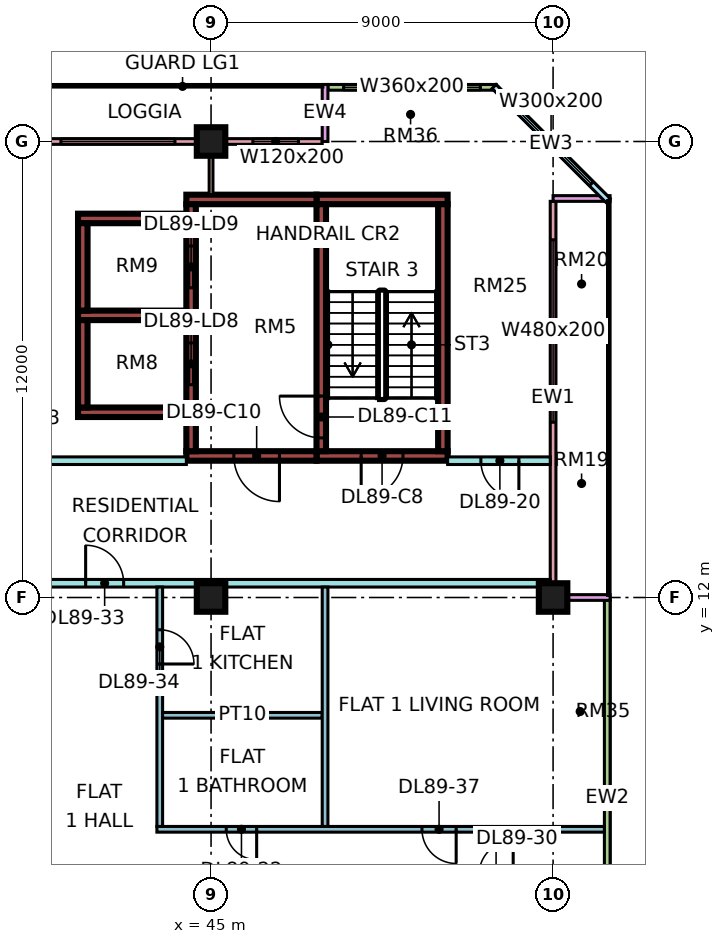
"""IFC4 building model, lengths in metres.
Left out: names, types, materials, properties, quantities, classifications, styles, units other than length and angle.
Written with IfcOpenShell. Run it as: python <this file> out.ifc"""

import sys

from ifc_helpers import new_model, si_unit, direction, frame, frame_2d, origin, origin_2d, place, context, subcontext, project, spatial, rectangle, extrude, element, fill, save


model = new_model("IFC4")
c1 = context("Model", 3, precision=1e-05, world=origin(), true_north=direction((0.0, 1.0)))
c2 = subcontext(c1, "Body", "Model", "MODEL_VIEW")
j1 = project(units=[si_unit("LENGTHUNIT", "METRE"), si_unit("PLANEANGLEUNIT", "RADIAN")], contexts=[c1])
p1 = place(None, origin())
s1 = spatial("IfcSite", under=j1, at=p1, CompositionType="ELEMENT")
p2 = place(p1, origin())
s2 = spatial("IfcBuilding", under=s1, at=p2, CompositionType="ELEMENT")
p3 = place(p2, frame((0.0, 0.0, 380.15)))
s3 = spatial("IfcBuildingStorey", under=s2, at=p3, CompositionType="ELEMENT", Elevation=380.15)
for number, where, z_axis, x_axis in (
    (1, (45.0, 12.0, 0.0), (0.0, 0.0, 1.0), (1.0, 0.0, 0.0)),
    (2, (45.0, 24.0, 0.0), (0.0, 0.0, 1.0), (1.0, 0.0, 0.0)),
    (3, (54.0, 12.0, 0.0), (0.0, 0.0, 1.0), (1.0, 0.0, 0.0)),
):
    element("IfcColumn", number, at=place(p3, frame(where, z_axis=z_axis, x_axis=x_axis)), inside=s3, PredefinedType="COLUMN", context=c2, shape_type="SweptSolid", body=[
        extrude(rectangle(XDim=0.75, YDim=0.75, at=origin_2d()), origin(), (0.0, 0.0, 1.0), 3.75),
    ])
p4 = place(p3, frame((47.775, 15.725, 0.0), z_axis=(0.0, 0.0, 1.0), x_axis=(1.0, 0.0, 0.0)))
e4 = element("IfcWall", 4, at=p4, inside=s3, PredefinedType="SHEAR", context=c2, shape_type="SweptSolid", body=[
    extrude(rectangle(XDim=3.45, YDim=0.25, at=frame_2d((1.725, 0.0))), origin(), (0.0, 0.0, 1.0), 3.75),
])
p5 = place(p4, frame((1.175, 0.0, 0.0)))
e5 = element("IfcOpeningElement", 5, at=p5, cuts=e4, PredefinedType="OPENING", context=c2, shape_type="SweptSolid", body=[
    extrude(rectangle(XDim=1.1, YDim=2.2, at=frame_2d((0.55, 1.1))), frame((0.0, 0.135, 0.0), z_axis=(0.0, -1.0, 0.0), x_axis=(1.0, 0.0, 0.0)), (0.0, 0.0, 1.0), 0.27),
])
p6 = place(p3, frame((47.775, 22.475, 0.0), z_axis=(0.0, 0.0, 1.0), x_axis=(1.0, 0.0, 0.0)))
e6 = element("IfcWall", 6, at=p6, inside=s3, PredefinedType="SHEAR", context=c2, shape_type="SweptSolid", body=[
    extrude(rectangle(XDim=3.45, YDim=0.25, at=frame_2d((1.725, 0.0))), origin(), (0.0, 0.0, 1.0), 3.75),
])
p7 = place(p3, frame((47.9, 15.85, 0.0), z_axis=(0.0, 0.0, 1.0), x_axis=(0.0, 1.0, 0.0)))
e7 = element("IfcWall", 7, at=p7, inside=s3, PredefinedType="SHEAR", context=c2, shape_type="SweptSolid", body=[
    extrude(rectangle(XDim=6.5, YDim=0.25, at=frame_2d((3.25, 0.0))), origin(), (0.0, 0.0, 1.0), 3.75),
])
p8 = place(p7, frame((0.35, 0.0, 0.0)))
e8 = element("IfcOpeningElement", 8, at=p8, cuts=e7, PredefinedType="OPENING", context=c2, shape_type="SweptSolid", body=[
    extrude(rectangle(XDim=1.1, YDim=2.2, at=frame_2d((0.55, 1.1))), frame((0.0, 0.135, 0.0), z_axis=(0.0, -1.0, 0.0), x_axis=(1.0, 0.0, 0.0)), (0.0, 0.0, 1.0), 0.27),
])
p9 = place(p3, frame((51.1, 15.85, 0.0), z_axis=(0.0, 0.0, 1.0), x_axis=(0.0, 1.0, 0.0)))
e9 = element("IfcWall", 9, at=p9, inside=s3, PredefinedType="SHEAR", context=c2, shape_type="SweptSolid", body=[
    extrude(rectangle(XDim=6.5, YDim=0.25, at=frame_2d((3.25, 0.0))), origin(), (0.0, 0.0, 1.0), 3.75),
])
p10 = place(p3, frame((44.35, 15.725, 0.0), z_axis=(0.0, 0.0, 1.0), x_axis=(1.0, 0.0, 0.0)))
e10 = element("IfcWall", 10, at=p10, inside=s3, PredefinedType="SHEAR", context=c2, shape_type="SweptSolid", body=[
    extrude(rectangle(XDim=3.425, YDim=0.25, at=frame_2d((1.712, 0.0))), origin(), (0.0, 0.0, 1.0), 3.75),
])
p11 = place(p10, frame((1.25, 0.0, 0.0)))
e11 = element("IfcOpeningElement", 11, at=p11, cuts=e10, PredefinedType="OPENING", context=c2, shape_type="SweptSolid", body=[
    extrude(rectangle(XDim=1.2, YDim=2.2, at=frame_2d((0.6, 1.1))), frame((0.0, 0.135, 0.0), z_axis=(0.0, -1.0, 0.0), x_axis=(1.0, 0.0, 0.0)), (0.0, 0.0, 1.0), 0.27),
])
p12 = place(p3, frame((44.35, 22.475, 0.0), z_axis=(0.0, 0.0, 1.0), x_axis=(1.0, 0.0, 0.0)))
e12 = element("IfcWall", 12, at=p12, inside=s3, PredefinedType="SHEAR", context=c2, shape_type="SweptSolid", body=[
    extrude(rectangle(XDim=3.425, YDim=0.25, at=frame_2d((1.712, 0.0))), origin(), (0.0, 0.0, 1.0), 3.75),
])
p13 = place(p3, frame((44.475, 15.85, 0.0), z_axis=(0.0, 0.0, 1.0), x_axis=(0.0, 1.0, 0.0)))
e13 = element("IfcWall", 13, at=p13, inside=s3, PredefinedType="SHEAR", context=c2, shape_type="SweptSolid", body=[
    extrude(rectangle(XDim=6.5, YDim=0.25, at=frame_2d((3.25, 0.0))), origin(), (0.0, 0.0, 1.0), 3.75),
])
p14 = place(p13, frame((1.75, 0.0, 0.0)))
e14 = element("IfcOpeningElement", 14, at=p14, cuts=e13, PredefinedType="OPENING", context=c2, shape_type="SweptSolid", body=[
    extrude(rectangle(XDim=1.1, YDim=2.2, at=frame_2d((0.55, 1.1))), frame((0.0, 0.135, 0.0), z_axis=(0.0, -1.0, 0.0), x_axis=(1.0, 0.0, 0.0)), (0.0, 0.0, 1.0), 0.27),
])
p15 = place(p13, frame((4.3, 0.0, 0.0)))
e15 = element("IfcOpeningElement", 15, at=p15, cuts=e13, PredefinedType="OPENING", context=c2, shape_type="SweptSolid", body=[
    extrude(rectangle(XDim=1.1, YDim=2.2, at=frame_2d((0.55, 1.1))), frame((0.0, 0.135, 0.0), z_axis=(0.0, -1.0, 0.0), x_axis=(1.0, 0.0, 0.0)), (0.0, 0.0, 1.0), 0.27),
])
for number, where, z_axis, x_axis in (
    (16, (41.5, 16.875, 0.0), (0.0, 0.0, 1.0), (1.0, 0.0, 0.0)),
    (17, (41.5, 19.425, 0.0), (0.0, 0.0, 1.0), (1.0, 0.0, 0.0)),
    (18, (41.5, 21.975, 0.0), (0.0, 0.0, 1.0), (1.0, 0.0, 0.0)),
):
    element("IfcWall", number, at=place(p3, frame(where, z_axis=z_axis, x_axis=x_axis)), inside=s3, PredefinedType="SHEAR", context=c2, shape_type="SweptSolid", body=[
        extrude(rectangle(XDim=2.85, YDim=0.25, at=frame_2d((1.425, 0.0))), origin(), (0.0, 0.0, 1.0), 3.75),
    ])
for number, where, z_axis, x_axis in (
    (19, (41.625, 17.0, 0.0), (0.0, 0.0, 1.0), (0.0, 1.0, 0.0)),
    (20, (41.625, 19.55, 0.0), (0.0, 0.0, 1.0), (0.0, 1.0, 0.0)),
):
    element("IfcWall", number, at=place(p3, frame(where, z_axis=z_axis, x_axis=x_axis)), inside=s3, PredefinedType="SHEAR", context=c2, shape_type="SweptSolid", body=[
        extrude(rectangle(XDim=2.3, YDim=0.25, at=frame_2d((1.15, 0.0))), origin(), (0.0, 0.0, 1.0), 3.75),
    ])
p16 = place(p3, frame((52.5, 25.425, 0.0), z_axis=(0.0, 0.0, 1.0), x_axis=(-1.0, 0.0, 0.0)))
e21 = element("IfcWall", 21, at=p16, inside=s3, PredefinedType="SOLIDWALL", context=c2, shape_type="SweptSolid", body=[
    extrude(rectangle(XDim=4.425, YDim=0.15, at=frame_2d((2.212, 0.0))), origin(), (0.0, 0.0, 1.0), 3.3),
])
p17 = place(p16, frame((0.413, 0.0, 0.45)))
e22 = element("IfcOpeningElement", 22, at=p17, cuts=e21, PredefinedType="OPENING", context=c2, shape_type="SweptSolid", body=[
    extrude(rectangle(XDim=3.6, YDim=2.0, at=frame_2d((1.8, 1.0))), frame((0.0, 0.085, 0.0), z_axis=(0.0, -1.0, 0.0), x_axis=(1.0, 0.0, 0.0)), (0.0, 0.0, 1.0), 0.17),
])
p18 = place(p3, frame((47.925, 24.0, 0.0), z_axis=(0.0, 0.0, 1.0), x_axis=(-1.0, 0.0, 0.0)))
e23 = element("IfcWall", 23, at=p18, inside=s3, PredefinedType="SOLIDWALL", context=c2, shape_type="SweptSolid", body=[
    extrude(rectangle(XDim=7.35, YDim=0.15, at=frame_2d((3.675, 0.0))), origin(), (0.0, 0.0, 1.0), 3.3),
])
p19 = place(p18, frame((0.625, 0.0, 0.45)))
e24 = element("IfcOpeningElement", 24, at=p19, cuts=e23, PredefinedType="OPENING", context=c2, shape_type="SweptSolid", body=[
    extrude(rectangle(XDim=1.2, YDim=2.0, at=frame_2d((0.6, 1.0))), frame((0.0, 0.085, 0.0), z_axis=(0.0, -1.0, 0.0), x_axis=(1.0, 0.0, 0.0)), (0.0, 0.0, 1.0), 0.17),
])
p20 = place(p18, frame((3.875, 0.0, 0.45)))
e25 = element("IfcOpeningElement", 25, at=p20, cuts=e23, PredefinedType="OPENING", context=c2, shape_type="SweptSolid", body=[
    extrude(rectangle(XDim=3.0, YDim=2.0, at=frame_2d((1.5, 1.0))), frame((0.0, 0.085, 0.0), z_axis=(0.0, -1.0, 0.0), x_axis=(1.0, 0.0, 0.0)), (0.0, 0.0, 1.0), 0.17),
])
p21 = place(p3, frame((48.0, 25.5, 0.0), z_axis=(0.0, 0.0, 1.0), x_axis=(0.0, -1.0, 0.0)))
e26 = element("IfcWall", 26, at=p21, inside=s3, PredefinedType="SOLIDWALL", context=c2, shape_type="SweptSolid", body=[
    extrude(rectangle(XDim=1.5, YDim=0.15, at=frame_2d((0.75, 0.0))), origin(), (0.0, 0.0, 1.0), 3.3),
])
p22 = place(p3, frame((55.425, 1.5, 0.0), z_axis=(0.0, 0.0, 1.0), x_axis=(0.0, 1.0, 0.0)))
e27 = element("IfcWall", 27, at=p22, inside=s3, PredefinedType="SOLIDWALL", context=c2, shape_type="SweptSolid", body=[
    extrude(rectangle(XDim=10.425, YDim=0.15, at=frame_2d((5.212, 0.0))), origin(), (0.0, 0.0, 1.0), 3.3),
])
p23 = place(p22, frame((0.4, 0.0, 0.45)))
e28 = element("IfcOpeningElement", 28, at=p23, cuts=e27, PredefinedType="OPENING", context=c2, shape_type="SweptSolid", body=[
    extrude(rectangle(XDim=2.4, YDim=2.0, at=frame_2d((1.2, 1.0))), frame((0.0, 0.085, 0.0), z_axis=(0.0, -1.0, 0.0), x_axis=(1.0, 0.0, 0.0)), (0.0, 0.0, 1.0), 0.17),
])
p24 = place(p3, frame((54.0, 12.075, 0.0), z_axis=(0.0, 0.0, 1.0), x_axis=(0.0, 1.0, 0.0)))
e29 = element("IfcWall", 29, at=p24, inside=s3, PredefinedType="SOLIDWALL", context=c2, shape_type="SweptSolid", body=[
    extrude(rectangle(XDim=10.35, YDim=0.15, at=frame_2d((5.175, 0.0))), origin(), (0.0, 0.0, 1.0), 3.3),
])
p25 = place(p24, frame((4.538, 0.0, 0.45)))
e30 = element("IfcOpeningElement", 30, at=p25, cuts=e29, PredefinedType="OPENING", context=c2, shape_type="SweptSolid", body=[
    extrude(rectangle(XDim=4.8, YDim=2.0, at=frame_2d((2.4, 1.0))), frame((0.0, 0.085, 0.0), z_axis=(0.0, -1.0, 0.0), x_axis=(1.0, 0.0, 0.0)), (0.0, 0.0, 1.0), 0.17),
])
for number, where, z_axis, x_axis in (
    (31, (55.5, 12.0, 0.0), (0.0, 0.0, 1.0), (-1.0, 0.0, 0.0)),
    (32, (55.5, 22.5, 0.0), (0.0, 0.0, 1.0), (-1.0, 0.0, 0.0)),
):
    element("IfcWall", number, at=place(p3, frame(where, z_axis=z_axis, x_axis=x_axis)), inside=s3, PredefinedType="SOLIDWALL", context=c2, shape_type="SweptSolid", body=[
        extrude(rectangle(XDim=1.5, YDim=0.15, at=frame_2d((0.75, 0.0))), origin(), (0.0, 0.0, 1.0), 3.3),
    ])
p26 = place(p3, frame((55.447, 22.447, 0.0), z_axis=(0.0, 0.0, 1.0), x_axis=(-0.707106781187, 0.707106781187, 0.0)))
e33 = element("IfcWall", 33, at=p26, inside=s3, PredefinedType="SOLIDWALL", context=c2, shape_type="SweptSolid", body=[
    extrude(rectangle(XDim=4.243, YDim=0.15, at=frame_2d((2.121, 0.0))), origin(), (0.0, 0.0, 1.0), 3.3),
])
p27 = place(p26, frame((0.621, 0.0, 0.45)))
e34 = element("IfcOpeningElement", 34, at=p27, cuts=e33, PredefinedType="OPENING", context=c2, shape_type="SweptSolid", body=[
    extrude(rectangle(XDim=3.0, YDim=2.0, at=frame_2d((1.5, 1.0))), frame((0.0, 0.085, 0.0), z_axis=(0.0, -1.0, 0.0), x_axis=(1.0, 0.0, 0.0)), (0.0, 0.0, 1.0), 0.17),
])
p28 = place(p3, frame((34.0, 15.6, 0.0), z_axis=(0.0, 0.0, 1.0), x_axis=(1.0, 0.0, 0.0)))
e35 = element("IfcWall", 35, at=p28, inside=s3, PredefinedType="PARTITIONING", context=c2, shape_type="SweptSolid", body=[
    extrude(rectangle(XDim=10.35, YDim=0.2, at=frame_2d((5.175, 0.0))), origin(), (0.0, 0.0, 1.0), 3.3),
])
p29 = place(p28, frame((5.6, 0.0, 0.0)))
e36 = element("IfcOpeningElement", 36, at=p29, cuts=e35, PredefinedType="OPENING", context=c2, shape_type="SweptSolid", body=[
    extrude(rectangle(XDim=1.0, YDim=2.1, at=frame_2d((0.5, 1.05))), frame((0.0, 0.11, 0.0), z_axis=(0.0, -1.0, 0.0), x_axis=(1.0, 0.0, 0.0)), (0.0, 0.0, 1.0), 0.22),
])
p30 = place(p28, frame((0.45, 0.0, 0.0)))
e37 = element("IfcOpeningElement", 37, at=p30, cuts=e35, PredefinedType="OPENING", context=c2, shape_type="SweptSolid", body=[
    extrude(rectangle(XDim=1.2, YDim=2.1, at=frame_2d((0.6, 1.05))), frame((0.0, 0.11, 0.0), z_axis=(0.0, -1.0, 0.0), x_axis=(1.0, 0.0, 0.0)), (0.0, 0.0, 1.0), 0.22),
])
p31 = place(p3, frame((40.65, 12.375, 0.0), z_axis=(0.0, 0.0, 1.0), x_axis=(1.0, 0.0, 0.0)))
e38 = element("IfcWall", 38, at=p31, inside=s3, PredefinedType="PARTITIONING", context=c2, shape_type="SweptSolid", body=[
    extrude(rectangle(XDim=13.276, YDim=0.2, at=frame_2d((6.638, 0.0))), origin(), (0.0, 0.0, 1.0), 3.3),
])
p32 = place(p31, frame((1.05, 0.0, 0.0)))
e39 = element("IfcOpeningElement", 39, at=p32, cuts=e38, PredefinedType="OPENING", context=c2, shape_type="SweptSolid", body=[
    extrude(rectangle(XDim=1.0, YDim=2.1, at=frame_2d((0.5, 1.05))), frame((0.0, 0.11, 0.0), z_axis=(0.0, -1.0, 0.0), x_axis=(1.0, 0.0, 0.0)), (0.0, 0.0, 1.0), 0.22),
])
p33 = place(p3, frame((43.575, 5.9, 0.0), z_axis=(0.0, 0.0, 1.0), x_axis=(1.0, 0.0, 0.0)))
e40 = element("IfcWall", 40, at=p33, inside=s3, PredefinedType="PARTITIONING", context=c2, shape_type="SweptSolid", body=[
    extrude(rectangle(XDim=11.775, YDim=0.15, at=frame_2d((5.888, 0.0))), origin(), (0.0, 0.0, 1.0), 3.3),
])
p34 = place(p33, frame((1.825, 0.0, 0.0)))
e41 = element("IfcOpeningElement", 41, at=p34, cuts=e40, PredefinedType="OPENING", context=c2, shape_type="SweptSolid", body=[
    extrude(rectangle(XDim=0.8, YDim=2.1, at=frame_2d((0.4, 1.05))), frame((0.0, 0.085, 0.0), z_axis=(0.0, -1.0, 0.0), x_axis=(1.0, 0.0, 0.0)), (0.0, 0.0, 1.0), 0.17),
])
p35 = place(p33, frame((6.975, 0.0, 0.0)))
e42 = element("IfcOpeningElement", 42, at=p35, cuts=e40, PredefinedType="OPENING", context=c2, shape_type="SweptSolid", body=[
    extrude(rectangle(XDim=0.9, YDim=2.1, at=frame_2d((0.45, 1.05))), frame((0.0, 0.085, 0.0), z_axis=(0.0, -1.0, 0.0), x_axis=(1.0, 0.0, 0.0)), (0.0, 0.0, 1.0), 0.17),
])
p36 = place(p3, frame((43.65, 5.975, 0.0), z_axis=(0.0, 0.0, 1.0), x_axis=(0.0, 1.0, 0.0)))
e43 = element("IfcWall", 43, at=p36, inside=s3, PredefinedType="PARTITIONING", context=c2, shape_type="SweptSolid", body=[
    extrude(rectangle(XDim=6.3, YDim=0.15, at=frame_2d((3.15, 0.0))), origin(), (0.0, 0.0, 1.0), 3.3),
])
p37 = place(p36, frame((4.275, 0.0, 0.0)))
e44 = element("IfcOpeningElement", 44, at=p37, cuts=e43, PredefinedType="OPENING", context=c2, shape_type="SweptSolid", body=[
    extrude(rectangle(XDim=0.9, YDim=2.1, at=frame_2d((0.45, 1.05))), frame((0.0, 0.085, 0.0), z_axis=(0.0, -1.0, 0.0), x_axis=(1.0, 0.0, 0.0)), (0.0, 0.0, 1.0), 0.17),
])
p38 = place(p3, frame((43.725, 8.9, 0.0), z_axis=(0.0, 0.0, 1.0), x_axis=(1.0, 0.0, 0.0)))
e45 = element("IfcWall", 45, at=p38, inside=s3, PredefinedType="PARTITIONING", context=c2, shape_type="SweptSolid", body=[
    extrude(rectangle(XDim=4.2, YDim=0.15, at=frame_2d((2.1, 0.0))), origin(), (0.0, 0.0, 1.0), 3.3),
])
p39 = place(p3, frame((45.0, 22.6, 0.0), z_axis=(0.0, 0.0, 1.0), x_axis=(0.0, 1.0, 0.0)))
e46 = element("IfcWall", 46, at=p39, inside=s3, PredefinedType="PARTITIONING", context=c2, shape_type="SweptSolid", body=[
    extrude(rectangle(XDim=1.326, YDim=0.1, at=frame_2d((0.663, 0.0))), origin(), (0.0, 0.0, 1.0), 3.3),
])
p40 = place(p3, frame((48.0, 5.975, 0.0), z_axis=(0.0, 0.0, 1.0), x_axis=(0.0, 1.0, 0.0)))
e47 = element("IfcWall", 47, at=p40, inside=s3, PredefinedType="PARTITIONING", context=c2, shape_type="SweptSolid", body=[
    extrude(rectangle(XDim=6.3, YDim=0.15, at=frame_2d((3.15, 0.0))), origin(), (0.0, 0.0, 1.0), 3.3),
])
p41 = place(p3, frame((51.225, 15.6, 0.0), z_axis=(0.0, 0.0, 1.0), x_axis=(1.0, 0.0, 0.0)))
e48 = element("IfcWall", 48, at=p41, inside=s3, PredefinedType="PARTITIONING", context=c2, shape_type="SweptSolid", body=[
    extrude(rectangle(XDim=2.701, YDim=0.2, at=frame_2d((1.351, 0.0))), origin(), (0.0, 0.0, 1.0), 3.3),
])
p42 = place(p41, frame((0.875, 0.0, 0.0)))
e49 = element("IfcOpeningElement", 49, at=p42, cuts=e48, PredefinedType="OPENING", context=c2, shape_type="SweptSolid", body=[
    extrude(rectangle(XDim=1.0, YDim=2.1, at=frame_2d((0.5, 1.05))), frame((0.0, 0.11, 0.0), z_axis=(0.0, -1.0, 0.0), x_axis=(1.0, 0.0, 0.0)), (0.0, 0.0, 1.0), 0.22),
])
p43 = place(p17, origin())
e50 = element("IfcWindow", 50, at=p43, inside=s3, PartitioningType="SINGLE_PANEL", PredefinedType="WINDOW", context=c2, shape_type="SweptSolid", body=[
    extrude(rectangle(XDim=3.6, YDim=2.0, at=frame_2d((1.8, 1.0))), frame((0.0, 0.03, 0.0), z_axis=(0.0, -1.0, 0.0), x_axis=(1.0, 0.0, 0.0)), (0.0, 0.0, 1.0), 0.06),
])
fill(e22, e50)
p44 = place(p19, origin())
e51 = element("IfcWindow", 51, at=p44, inside=s3, PartitioningType="SINGLE_PANEL", PredefinedType="WINDOW", context=c2, shape_type="SweptSolid", body=[
    extrude(rectangle(XDim=1.2, YDim=2.0, at=frame_2d((0.6, 1.0))), frame((0.0, 0.03, 0.0), z_axis=(0.0, -1.0, 0.0), x_axis=(1.0, 0.0, 0.0)), (0.0, 0.0, 1.0), 0.06),
])
fill(e24, e51)
p45 = place(p20, origin())
e52 = element("IfcWindow", 52, at=p45, inside=s3, PartitioningType="SINGLE_PANEL", PredefinedType="WINDOW", context=c2, shape_type="SweptSolid", body=[
    extrude(rectangle(XDim=3.0, YDim=2.0, at=frame_2d((1.5, 1.0))), frame((0.0, 0.03, 0.0), z_axis=(0.0, -1.0, 0.0), x_axis=(1.0, 0.0, 0.0)), (0.0, 0.0, 1.0), 0.06),
])
fill(e25, e52)
p46 = place(p25, origin())
e53 = element("IfcWindow", 53, at=p46, inside=s3, PartitioningType="SINGLE_PANEL", PredefinedType="WINDOW", context=c2, shape_type="SweptSolid", body=[
    extrude(rectangle(XDim=4.8, YDim=2.0, at=frame_2d((2.4, 1.0))), frame((0.0, 0.03, 0.0), z_axis=(0.0, -1.0, 0.0), x_axis=(1.0, 0.0, 0.0)), (0.0, 0.0, 1.0), 0.06),
])
fill(e30, e53)
p47 = place(p27, origin())
e54 = element("IfcWindow", 54, at=p47, inside=s3, PartitioningType="SINGLE_PANEL", PredefinedType="WINDOW", context=c2, shape_type="SweptSolid", body=[
    extrude(rectangle(XDim=3.0, YDim=2.0, at=frame_2d((1.5, 1.0))), frame((0.0, 0.03, 0.0), z_axis=(0.0, -1.0, 0.0), x_axis=(1.0, 0.0, 0.0)), (0.0, 0.0, 1.0), 0.06),
])
fill(e34, e54)
p48 = place(p5, frame((1.1, 0.0, 0.0), z_axis=(0.0, 0.0, 1.0), x_axis=(-1.0, 0.0, 0.0)))
e55 = element("IfcDoor", 55, at=p48, inside=s3, OperationType="SINGLE_SWING_LEFT", PredefinedType="DOOR", context=c2, shape_type="SweptSolid", body=[
    extrude(rectangle(XDim=1.1, YDim=2.2, at=frame_2d((0.55, 1.1))), frame((0.0, 0.025, 0.0), z_axis=(0.0, -1.0, 0.0), x_axis=(1.0, 0.0, 0.0)), (0.0, 0.0, 1.0), 0.05),
])
fill(e5, e55)
p49 = place(p11, origin())
e56 = element("IfcDoor", 56, at=p49, inside=s3, OperationType="SINGLE_SWING_RIGHT", PredefinedType="DOOR", context=c2, shape_type="SweptSolid", body=[
    extrude(rectangle(XDim=1.2, YDim=2.2, at=frame_2d((0.6, 1.1))), frame((0.0, 0.025, 0.0), z_axis=(0.0, -1.0, 0.0), x_axis=(1.0, 0.0, 0.0)), (0.0, 0.0, 1.0), 0.05),
])
fill(e11, e56)
p50 = place(p8, frame((1.1, 0.0, 0.0), z_axis=(0.0, 0.0, 1.0), x_axis=(-1.0, 0.0, 0.0)))
e57 = element("IfcDoor", 57, at=p50, inside=s3, OperationType="SINGLE_SWING_RIGHT", PredefinedType="DOOR", context=c2, shape_type="SweptSolid", body=[
    extrude(rectangle(XDim=1.1, YDim=2.2, at=frame_2d((0.55, 1.1))), frame((0.0, 0.025, 0.0), z_axis=(0.0, -1.0, 0.0), x_axis=(1.0, 0.0, 0.0)), (0.0, 0.0, 1.0), 0.05),
])
fill(e8, e57)
p51 = place(p14, origin())
e58 = element("IfcDoor", 58, at=p51, inside=s3, OperationType="DOUBLE_DOOR_SLIDING", PredefinedType="DOOR", context=c2, shape_type="SweptSolid", body=[
    extrude(rectangle(XDim=1.1, YDim=2.2, at=frame_2d((0.55, 1.1))), frame((0.0, 0.025, 0.0), z_axis=(0.0, -1.0, 0.0), x_axis=(1.0, 0.0, 0.0)), (0.0, 0.0, 1.0), 0.05),
])
fill(e14, e58)
p52 = place(p15, origin())
e59 = element("IfcDoor", 59, at=p52, inside=s3, OperationType="DOUBLE_DOOR_SLIDING", PredefinedType="DOOR", context=c2, shape_type="SweptSolid", body=[
    extrude(rectangle(XDim=1.1, YDim=2.2, at=frame_2d((0.55, 1.1))), frame((0.0, 0.025, 0.0), z_axis=(0.0, -1.0, 0.0), x_axis=(1.0, 0.0, 0.0)), (0.0, 0.0, 1.0), 0.05),
])
fill(e15, e59)
p53 = place(p42, origin())
e60 = element("IfcDoor", 60, at=p53, inside=s3, OperationType="SINGLE_SWING_RIGHT", PredefinedType="DOOR", context=c2, shape_type="SweptSolid", body=[
    extrude(rectangle(XDim=1.0, YDim=2.1, at=frame_2d((0.5, 1.05))), frame((0.0, 0.025, 0.0), z_axis=(0.0, -1.0, 0.0), x_axis=(1.0, 0.0, 0.0)), (0.0, 0.0, 1.0), 0.05),
])
fill(e49, e60)
p54 = place(p34, origin())
e61 = element("IfcDoor", 61, at=p54, inside=s3, OperationType="SINGLE_SWING_RIGHT", PredefinedType="DOOR", context=c2, shape_type="SweptSolid", body=[
    extrude(rectangle(XDim=0.8, YDim=2.1, at=frame_2d((0.4, 1.05))), frame((0.0, 0.025, 0.0), z_axis=(0.0, -1.0, 0.0), x_axis=(1.0, 0.0, 0.0)), (0.0, 0.0, 1.0), 0.05),
])
fill(e41, e61)
p55 = place(p32, origin())
e62 = element("IfcDoor", 62, at=p55, inside=s3, OperationType="SINGLE_SWING_LEFT", PredefinedType="DOOR", context=c2, shape_type="SweptSolid", body=[
    extrude(rectangle(XDim=1.0, YDim=2.1, at=frame_2d((0.5, 1.05))), frame((0.0, 0.025, 0.0), z_axis=(0.0, -1.0, 0.0), x_axis=(1.0, 0.0, 0.0)), (0.0, 0.0, 1.0), 0.05),
])
fill(e39, e62)
p56 = place(p37, frame((0.9, 0.0, 0.0), z_axis=(0.0, 0.0, 1.0), x_axis=(-1.0, 0.0, 0.0)))
e63 = element("IfcDoor", 63, at=p56, inside=s3, OperationType="SINGLE_SWING_LEFT", PredefinedType="DOOR", context=c2, shape_type="SweptSolid", body=[
    extrude(rectangle(XDim=0.9, YDim=2.1, at=frame_2d((0.45, 1.05))), frame((0.0, 0.025, 0.0), z_axis=(0.0, -1.0, 0.0), x_axis=(1.0, 0.0, 0.0)), (0.0, 0.0, 1.0), 0.05),
])
fill(e44, e63)
p57 = place(p35, origin())
e64 = element("IfcDoor", 64, at=p57, inside=s3, OperationType="SINGLE_SWING_RIGHT", PredefinedType="DOOR", context=c2, shape_type="SweptSolid", body=[
    extrude(rectangle(XDim=0.9, YDim=2.1, at=frame_2d((0.45, 1.05))), frame((0.0, 0.025, 0.0), z_axis=(0.0, -1.0, 0.0), x_axis=(1.0, 0.0, 0.0)), (0.0, 0.0, 1.0), 0.05),
])
fill(e42, e64)
save(model, sys.argv[1])
